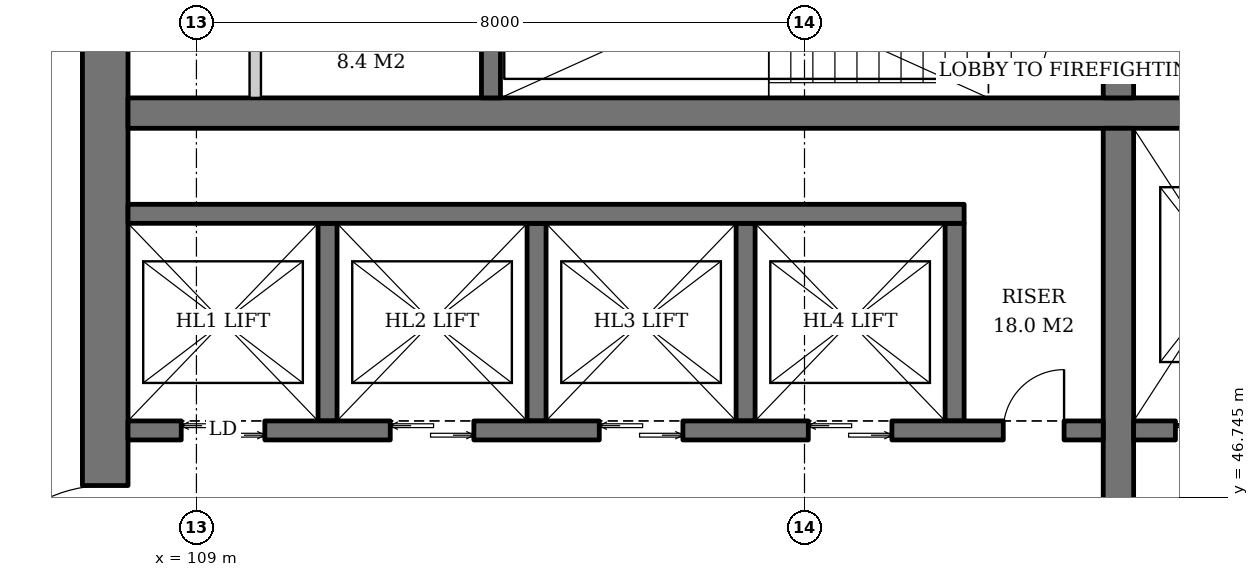
"""IFC4 building model, lengths in metres.
Left out: names, types, materials, properties, quantities, classifications, styles, units other than length and angle.
Written with IfcOpenShell. Run it as: python <this file> out.ifc"""

import sys

from ifc_helpers import new_model, si_unit, direction, frame, frame_2d, origin, place, context, subcontext, project, spatial, rectangle, extrude, element, fill, save


model = new_model("IFC4")
c1 = context("Model", 3, precision=1e-05, world=origin(), true_north=direction((0.0, 1.0)))
c2 = subcontext(c1, "Body", "Model", "MODEL_VIEW")
j1 = project(units=[si_unit("LENGTHUNIT", "METRE"), si_unit("PLANEANGLEUNIT", "RADIAN")], contexts=[c1])
p1 = place(None, origin())
s1 = spatial("IfcSite", under=j1, at=p1, CompositionType="ELEMENT")
p2 = place(p1, origin())
s2 = spatial("IfcBuilding", under=s1, at=p2, CompositionType="ELEMENT")
p3 = place(p2, frame((0.0, 0.0, 123.6)))
s3 = spatial("IfcBuildingStorey", under=s2, at=p3, CompositionType="ELEMENT", Elevation=123.6)
p4 = place(p3, frame((107.8, 37.1, 0.0), z_axis=(0.0, 0.0, 1.0), x_axis=(0.0, 1.0, 0.0)))
e1 = element("IfcWall", 1, at=p4, inside=s3, PredefinedType="SHEAR", context=c2, shape_type="SweptSolid", body=[
    extrude(rectangle(XDim=17.8, YDim=0.6, at=frame_2d((8.9, 0.0))), origin(), (0.0, 0.0, 1.0), 3.8),
])
p5 = place(p4, frame((8.0, 0.0, 0.0)))
e2 = element("IfcOpeningElement", 2, at=p5, cuts=e1, PredefinedType="OPENING", context=c2, shape_type="SweptSolid", body=[
    extrude(rectangle(XDim=1.8, YDim=2.4, at=frame_2d((0.9, 1.2))), frame((0.0, 0.31, 0.0), z_axis=(0.0, -1.0, 0.0), x_axis=(1.0, 0.0, 0.0)), (0.0, 0.0, 1.0), 0.62),
])
p6 = place(p3, frame((108.1, 51.8, 0.0), z_axis=(0.0, 0.0, 1.0), x_axis=(1.0, 0.0, 0.0)))
e3 = element("IfcWall", 3, at=p6, inside=s3, PredefinedType="SHEAR", context=c2, shape_type="SweptSolid", body=[
    extrude(rectangle(XDim=17.8, YDim=0.4, at=frame_2d((8.9, 0.0))), origin(), (0.0, 0.0, 1.0), 3.8),
])
p7 = place(p3, frame((121.13, 40.4, 0.0), z_axis=(0.0, 0.0, 1.0), x_axis=(0.0, 1.0, 0.0)))
e4 = element("IfcWall", 4, at=p7, inside=s3, PredefinedType="SHEAR", context=c2, shape_type="SweptSolid", body=[
    extrude(rectangle(XDim=11.2, YDim=0.4, at=frame_2d((5.6, 0.0))), origin(), (0.0, 0.0, 1.0), 3.8),
])
p8 = place(p3, frame((121.13, 52.0, 0.0), z_axis=(0.0, 0.0, 1.0), x_axis=(0.0, 1.0, 0.0)))
e5 = element("IfcWall", 5, at=p8, inside=s3, PredefinedType="SHEAR", context=c2, shape_type="SweptSolid", body=[
    extrude(rectangle(XDim=2.9, YDim=0.4, at=frame_2d((1.45, 0.0))), origin(), (0.0, 0.0, 1.0), 3.8),
])
p9 = place(p8, frame((0.3, 0.0, 0.0)))
e6 = element("IfcOpeningElement", 6, at=p9, cuts=e5, PredefinedType="OPENING", context=c2, shape_type="SweptSolid", body=[
    extrude(rectangle(XDim=1.0, YDim=2.1, at=frame_2d((0.5, 1.05))), frame((0.0, 0.21, 0.0), z_axis=(0.0, -1.0, 0.0), x_axis=(1.0, 0.0, 0.0)), (0.0, 0.0, 1.0), 0.42),
])
p10 = place(p3, frame((112.875, 52.0, 0.0), z_axis=(0.0, 0.0, 1.0), x_axis=(0.0, 1.0, 0.0)))
e7 = element("IfcWall", 7, at=p10, inside=s3, PredefinedType="SHEAR", context=c2, shape_type="SweptSolid", body=[
    extrude(rectangle(XDim=2.9, YDim=0.25, at=frame_2d((1.45, 0.0))), origin(), (0.0, 0.0, 1.0), 3.8),
])
for number, where, z_axis, x_axis in (
    (8, (110.725, 47.75, 0.0), (0.0, 0.0, 1.0), (0.0, 1.0, 0.0)),
    (9, (113.475, 47.75, 0.0), (0.0, 0.0, 1.0), (0.0, 1.0, 0.0)),
    (10, (116.225, 47.75, 0.0), (0.0, 0.0, 1.0), (0.0, 1.0, 0.0)),
    (11, (118.975, 47.75, 0.0), (0.0, 0.0, 1.0), (0.0, 1.0, 0.0)),
):
    element("IfcWall", number, at=place(p3, frame(where, z_axis=z_axis, x_axis=x_axis)), inside=s3, PredefinedType="SHEAR", context=c2, shape_type="SweptSolid", body=[
        extrude(rectangle(XDim=2.6, YDim=0.25, at=frame_2d((1.3, 0.0))), origin(), (0.0, 0.0, 1.0), 3.8),
    ])
p11 = place(p3, frame((108.1, 50.475, 0.0), z_axis=(0.0, 0.0, 1.0), x_axis=(1.0, 0.0, 0.0)))
e12 = element("IfcWall", 12, at=p11, inside=s3, PredefinedType="SHEAR", context=c2, shape_type="SweptSolid", body=[
    extrude(rectangle(XDim=11.0, YDim=0.25, at=frame_2d((5.5, 0.0))), origin(), (0.0, 0.0, 1.0), 3.8),
])
p12 = place(p3, frame((108.1, 47.625, 0.0), z_axis=(0.0, 0.0, 1.0), x_axis=(1.0, 0.0, 0.0)))
e13 = element("IfcWall", 13, at=p12, inside=s3, PredefinedType="SHEAR", context=c2, shape_type="SweptSolid", body=[
    extrude(rectangle(XDim=12.83, YDim=0.25, at=frame_2d((6.415, 0.0))), origin(), (0.0, 0.0, 1.0), 3.8),
])
p13 = place(p12, frame((0.7, 0.0, 0.0)))
e14 = element("IfcOpeningElement", 14, at=p13, cuts=e13, PredefinedType="OPENING", context=c2, shape_type="SweptSolid", body=[
    extrude(rectangle(XDim=1.1, YDim=2.2, at=frame_2d((0.55, 1.1))), frame((0.0, 0.135, 0.0), z_axis=(0.0, -1.0, 0.0), x_axis=(1.0, 0.0, 0.0)), (0.0, 0.0, 1.0), 0.27),
])
p14 = place(p12, frame((3.45, 0.0, 0.0)))
e15 = element("IfcOpeningElement", 15, at=p14, cuts=e13, PredefinedType="OPENING", context=c2, shape_type="SweptSolid", body=[
    extrude(rectangle(XDim=1.1, YDim=2.2, at=frame_2d((0.55, 1.1))), frame((0.0, 0.135, 0.0), z_axis=(0.0, -1.0, 0.0), x_axis=(1.0, 0.0, 0.0)), (0.0, 0.0, 1.0), 0.27),
])
p15 = place(p12, frame((6.2, 0.0, 0.0)))
e16 = element("IfcOpeningElement", 16, at=p15, cuts=e13, PredefinedType="OPENING", context=c2, shape_type="SweptSolid", body=[
    extrude(rectangle(XDim=1.1, YDim=2.2, at=frame_2d((0.55, 1.1))), frame((0.0, 0.135, 0.0), z_axis=(0.0, -1.0, 0.0), x_axis=(1.0, 0.0, 0.0)), (0.0, 0.0, 1.0), 0.27),
])
p16 = place(p12, frame((8.95, 0.0, 0.0)))
e17 = element("IfcOpeningElement", 17, at=p16, cuts=e13, PredefinedType="OPENING", context=c2, shape_type="SweptSolid", body=[
    extrude(rectangle(XDim=1.1, YDim=2.2, at=frame_2d((0.55, 1.1))), frame((0.0, 0.135, 0.0), z_axis=(0.0, -1.0, 0.0), x_axis=(1.0, 0.0, 0.0)), (0.0, 0.0, 1.0), 0.27),
])
p17 = place(p12, frame((11.515, 0.0, 0.0)))
e18 = element("IfcOpeningElement", 18, at=p17, cuts=e13, PredefinedType="OPENING", context=c2, shape_type="SweptSolid", body=[
    extrude(rectangle(XDim=0.8, YDim=2.0, at=frame_2d((0.4, 1.0))), frame((0.0, 0.135, 0.0), z_axis=(0.0, -1.0, 0.0), x_axis=(1.0, 0.0, 0.0)), (0.0, 0.0, 1.0), 0.27),
])
p18 = place(p3, frame((121.33, 47.625, 0.0), z_axis=(0.0, 0.0, 1.0), x_axis=(1.0, 0.0, 0.0)))
e19 = element("IfcWall", 19, at=p18, inside=s3, PredefinedType="SHEAR", context=c2, shape_type="SweptSolid", body=[
    extrude(rectangle(XDim=4.57, YDim=0.25, at=frame_2d((2.285, 0.0))), origin(), (0.0, 0.0, 1.0), 3.8),
])
p19 = place(p18, frame((0.55, 0.0, 0.0)))
e20 = element("IfcOpeningElement", 20, at=p19, cuts=e19, PredefinedType="OPENING", context=c2, shape_type="SweptSolid", body=[
    extrude(rectangle(XDim=1.4, YDim=2.4, at=frame_2d((0.7, 1.2))), frame((0.0, 0.135, 0.0), z_axis=(0.0, -1.0, 0.0), x_axis=(1.0, 0.0, 0.0)), (0.0, 0.0, 1.0), 0.27),
])
p20 = place(p18, frame((3.26, 0.0, 0.0)))
e21 = element("IfcOpeningElement", 21, at=p20, cuts=e19, PredefinedType="OPENING", context=c2, shape_type="SweptSolid", body=[
    extrude(rectangle(XDim=0.8, YDim=2.0, at=frame_2d((0.4, 1.0))), frame((0.0, 0.135, 0.0), z_axis=(0.0, -1.0, 0.0), x_axis=(1.0, 0.0, 0.0)), (0.0, 0.0, 1.0), 0.27),
])
p21 = place(p3, frame((109.774, 52.0, 0.0), z_axis=(0.0, 0.0, 1.0), x_axis=(0.0, 1.0, 0.0)))
e22 = element("IfcWall", 22, at=p21, inside=s3, PredefinedType="SOLIDWALL", context=c2, shape_type="SweptSolid", body=[
    extrude(rectangle(XDim=2.9, YDim=0.15, at=frame_2d((1.45, 0.0))), origin(), (0.0, 0.0, 1.0), 3.6),
])
p22 = place(p13, origin())
e23 = element("IfcDoor", 23, at=p22, inside=s3, OperationType="DOUBLE_DOOR_SLIDING", PredefinedType="DOOR", context=c2, shape_type="SweptSolid", body=[
    extrude(rectangle(XDim=1.1, YDim=2.2, at=frame_2d((0.55, 1.1))), frame((0.0, 0.025, 0.0), z_axis=(0.0, -1.0, 0.0), x_axis=(1.0, 0.0, 0.0)), (0.0, 0.0, 1.0), 0.05),
])
fill(e14, e23)
p23 = place(p14, origin())
e24 = element("IfcDoor", 24, at=p23, inside=s3, OperationType="DOUBLE_DOOR_SLIDING", PredefinedType="DOOR", context=c2, shape_type="SweptSolid", body=[
    extrude(rectangle(XDim=1.1, YDim=2.2, at=frame_2d((0.55, 1.1))), frame((0.0, 0.025, 0.0), z_axis=(0.0, -1.0, 0.0), x_axis=(1.0, 0.0, 0.0)), (0.0, 0.0, 1.0), 0.05),
])
fill(e15, e24)
p24 = place(p15, origin())
e25 = element("IfcDoor", 25, at=p24, inside=s3, OperationType="DOUBLE_DOOR_SLIDING", PredefinedType="DOOR", context=c2, shape_type="SweptSolid", body=[
    extrude(rectangle(XDim=1.1, YDim=2.2, at=frame_2d((0.55, 1.1))), frame((0.0, 0.025, 0.0), z_axis=(0.0, -1.0, 0.0), x_axis=(1.0, 0.0, 0.0)), (0.0, 0.0, 1.0), 0.05),
])
fill(e16, e25)
p25 = place(p16, origin())
e26 = element("IfcDoor", 26, at=p25, inside=s3, OperationType="DOUBLE_DOOR_SLIDING", PredefinedType="DOOR", context=c2, shape_type="SweptSolid", body=[
    extrude(rectangle(XDim=1.1, YDim=2.2, at=frame_2d((0.55, 1.1))), frame((0.0, 0.025, 0.0), z_axis=(0.0, -1.0, 0.0), x_axis=(1.0, 0.0, 0.0)), (0.0, 0.0, 1.0), 0.05),
])
fill(e17, e26)
p26 = place(p17, origin())
e27 = element("IfcDoor", 27, at=p26, inside=s3, OperationType="SINGLE_SWING_RIGHT", PredefinedType="DOOR", context=c2, shape_type="SweptSolid", body=[
    extrude(rectangle(XDim=0.8, YDim=2.0, at=frame_2d((0.4, 1.0))), frame((0.0, 0.025, 0.0), z_axis=(0.0, -1.0, 0.0), x_axis=(1.0, 0.0, 0.0)), (0.0, 0.0, 1.0), 0.05),
])
fill(e18, e27)
p27 = place(p19, origin())
e28 = element("IfcDoor", 28, at=p27, inside=s3, OperationType="DOUBLE_DOOR_SLIDING", PredefinedType="DOOR", context=c2, shape_type="SweptSolid", body=[
    extrude(rectangle(XDim=1.4, YDim=2.4, at=frame_2d((0.7, 1.2))), frame((0.0, 0.025, 0.0), z_axis=(0.0, -1.0, 0.0), x_axis=(1.0, 0.0, 0.0)), (0.0, 0.0, 1.0), 0.05),
])
fill(e20, e28)
p28 = place(p9, origin())
e29 = element("IfcDoor", 29, at=p28, inside=s3, OperationType="SINGLE_SWING_LEFT", PredefinedType="DOOR", context=c2, shape_type="SweptSolid", body=[
    extrude(rectangle(XDim=1.0, YDim=2.1, at=frame_2d((0.5, 1.05))), frame((0.0, 0.025, 0.0), z_axis=(0.0, -1.0, 0.0), x_axis=(1.0, 0.0, 0.0)), (0.0, 0.0, 1.0), 0.05),
])
fill(e6, e29)
p29 = place(p5, origin())
e30 = element("IfcDoor", 30, at=p29, inside=s3, OperationType="DOUBLE_DOOR_SINGLE_SWING", PredefinedType="DOOR", context=c2, shape_type="SweptSolid", body=[
    extrude(rectangle(XDim=1.8, YDim=2.4, at=frame_2d((0.9, 1.2))), frame((0.0, 0.025, 0.0), z_axis=(0.0, -1.0, 0.0), x_axis=(1.0, 0.0, 0.0)), (0.0, 0.0, 1.0), 0.05),
])
fill(e2, e30)
save(model, sys.argv[1])
